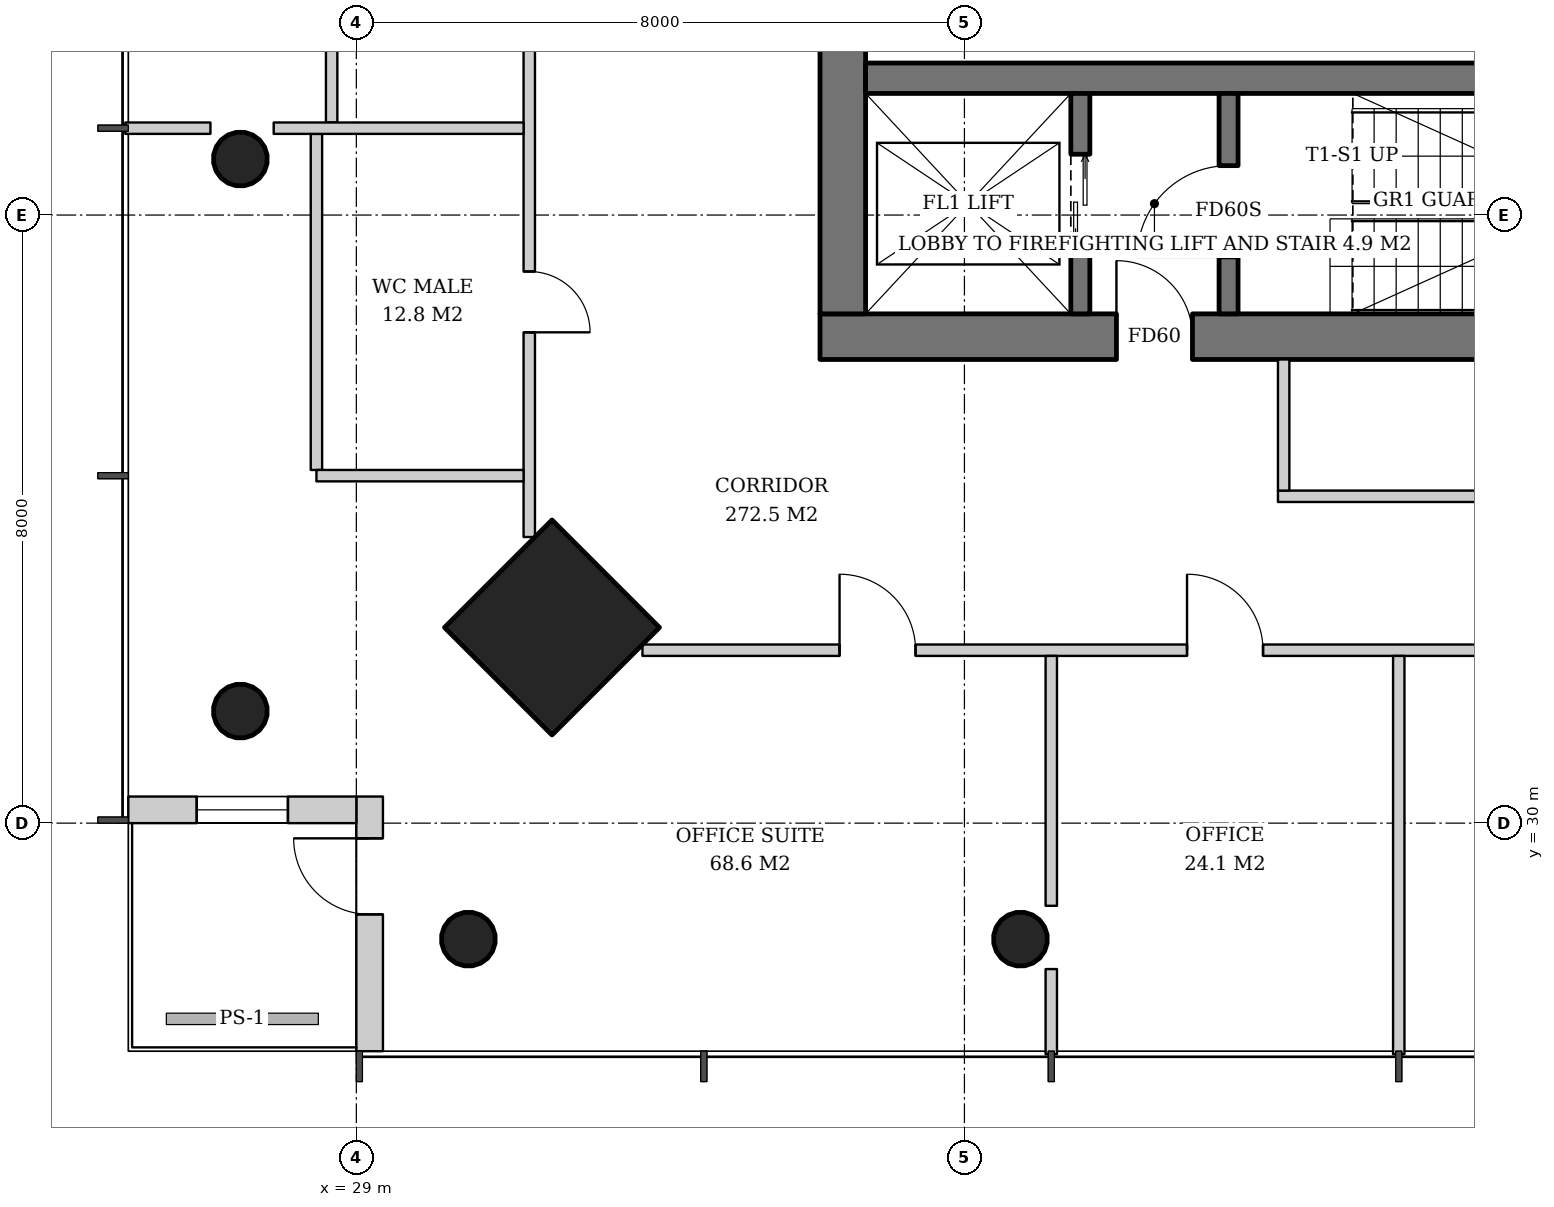
"""IFC4 building model, lengths in metres.
Left out: names, types, materials, properties, quantities, classifications, styles, units other than length and angle.
Written with IfcOpenShell. Run it as: python <this file> out.ifc"""

import sys

from ifc_helpers import new_model, si_unit, direction, frame, frame_2d, origin, origin_2d, place, context, subcontext, project, spatial, rectangle, hollow_circle, extrude, element, fill, save


model = new_model("IFC4")
c1 = context("Model", 3, precision=1e-05, world=origin(), true_north=direction((0.0, 1.0)))
c2 = subcontext(c1, "Body", "Model", "MODEL_VIEW")
j1 = project(units=[si_unit("LENGTHUNIT", "METRE"), si_unit("PLANEANGLEUNIT", "RADIAN")], contexts=[c1])
p1 = place(None, origin())
s1 = spatial("IfcSite", under=j1, at=p1, CompositionType="ELEMENT")
p2 = place(p1, origin())
s2 = spatial("IfcBuilding", under=s1, at=p2, CompositionType="ELEMENT")
p3 = place(p2, frame((0.0, 0.0, 222.4)))
s3 = spatial("IfcBuildingStorey", under=s2, at=p3, CompositionType="ELEMENT", Elevation=222.4)
p4 = place(p3, frame((31.536, 32.536, 0.0), z_axis=(0.031962158256, 0.031962158256, 0.998977898093), x_axis=(-0.707106781187, 0.707106781187, 0.0)))
e1 = element("IfcColumn", 1, at=p4, inside=s3, PredefinedType="COLUMN", context=c2, shape_type="SweptSolid", body=[
    extrude(rectangle(XDim=2.0, YDim=2.0, at=origin_2d()), origin(), (0.0, 0.0, 1.0), 3.804),
])
p5 = place(p3, frame((27.436, 31.436, 0.0), z_axis=(0.031898107953, 0.031898107953, 0.998981992539), x_axis=(-0.707106781187, 0.707106781187, 0.0)))
e2 = element("IfcColumn", 2, at=p5, inside=s3, PredefinedType="COLUMN", context=c2, shape_type="SweptSolid", body=[
    extrude(hollow_circle(Radius=0.355, WallThickness=0.025, at=origin_2d()), origin(), (0.0, 0.0, 1.0), 3.804),
])
p6 = place(p3, frame((27.436, 38.718, 0.0), z_axis=(0.031910269556, 0.015987237665, 0.999362868496), x_axis=(-0.447933021895, 0.894067115991, 0.0)))
e3 = element("IfcColumn", 3, at=p6, inside=s3, PredefinedType="COLUMN", context=c2, shape_type="SweptSolid", body=[
    extrude(hollow_circle(Radius=0.355, WallThickness=0.025, at=origin_2d()), origin(), (0.0, 0.0, 1.0), 3.802),
])
p7 = place(p3, frame((30.436, 28.436, 0.0), z_axis=(0.031898107953, 0.031898107953, 0.998981992539), x_axis=(-0.707106781187, 0.707106781187, 0.0)))
e4 = element("IfcColumn", 4, at=p7, inside=s3, PredefinedType="COLUMN", context=c2, shape_type="SweptSolid", body=[
    extrude(hollow_circle(Radius=0.355, WallThickness=0.025, at=origin_2d()), origin(), (0.0, 0.0, 1.0), 3.804),
])
p8 = place(p3, frame((37.718, 28.436, 0.0), z_axis=(0.015987237665, 0.031910269556, 0.999362868496), x_axis=(-0.894067115991, 0.447933021895, 0.0)))
e5 = element("IfcColumn", 5, at=p8, inside=s3, PredefinedType="COLUMN", context=c2, shape_type="SweptSolid", body=[
    extrude(hollow_circle(Radius=0.355, WallThickness=0.025, at=origin_2d()), origin(), (0.0, 0.0, 1.0), 3.802),
])
p9 = place(p3, frame((35.1, 36.4, 0.0), z_axis=(0.0, 0.0, 1.0), x_axis=(1.0, 0.0, 0.0)))
e6 = element("IfcWall", 6, at=p9, inside=s3, PredefinedType="SHEAR", context=c2, shape_type="SweptSolid", body=[
    extrude(rectangle(XDim=19.8, YDim=0.6, at=frame_2d((9.9, 0.0))), origin(), (0.0, 0.0, 1.0), 3.8),
])
p10 = place(p9, frame((3.9, 0.0, 0.0)))
e7 = element("IfcOpeningElement", 7, at=p10, cuts=e6, PredefinedType="OPENING", context=c2, shape_type="SweptSolid", body=[
    extrude(rectangle(XDim=1.0, YDim=2.1, at=frame_2d((0.5, 1.05))), frame((0.0, 0.31, 0.0), z_axis=(0.0, -1.0, 0.0), x_axis=(1.0, 0.0, 0.0)), (0.0, 0.0, 1.0), 0.62),
])
p11 = place(p9, frame((15.35, 0.0, 0.0)))
e8 = element("IfcOpeningElement", 8, at=p11, cuts=e6, PredefinedType="OPENING", context=c2, shape_type="SweptSolid", body=[
    extrude(rectangle(XDim=1.0, YDim=2.1, at=frame_2d((0.5, 1.05))), frame((0.0, 0.31, 0.0), z_axis=(0.0, -1.0, 0.0), x_axis=(1.0, 0.0, 0.0)), (0.0, 0.0, 1.0), 0.62),
])
p12 = place(p3, frame((35.4, 36.7, 0.0), z_axis=(0.0, 0.0, 1.0), x_axis=(0.0, 1.0, 0.0)))
e9 = element("IfcWall", 9, at=p12, inside=s3, PredefinedType="SHEAR", context=c2, shape_type="SweptSolid", body=[
    extrude(rectangle(XDim=18.6, YDim=0.6, at=frame_2d((9.3, 0.0))), origin(), (0.0, 0.0, 1.0), 3.8),
])
p13 = place(p12, frame((8.4, 0.0, 0.0)))
e10 = element("IfcOpeningElement", 10, at=p13, cuts=e9, PredefinedType="OPENING", context=c2, shape_type="SweptSolid", body=[
    extrude(rectangle(XDim=1.8, YDim=2.4, at=frame_2d((0.9, 1.2))), frame((0.0, 0.31, 0.0), z_axis=(0.0, -1.0, 0.0), x_axis=(1.0, 0.0, 0.0)), (0.0, 0.0, 1.0), 0.62),
])
p14 = place(p3, frame((35.7, 39.8, 0.0), z_axis=(0.0, 0.0, 1.0), x_axis=(1.0, 0.0, 0.0)))
e11 = element("IfcWall", 11, at=p14, inside=s3, PredefinedType="SHEAR", context=c2, shape_type="SweptSolid", body=[
    extrude(rectangle(XDim=18.6, YDim=0.4, at=frame_2d((9.3, 0.0))), origin(), (0.0, 0.0, 1.0), 3.8),
])
p15 = place(p3, frame((29.175, 27.0, 0.0), z_axis=(0.0, 0.0, 1.0), x_axis=(0.0, 1.0, 0.0)))
e12 = element("IfcWall", 12, at=p15, inside=s3, PredefinedType="SOLIDWALL", context=c2, shape_type="SweptSolid", body=[
    extrude(rectangle(XDim=3.35, YDim=0.35, at=frame_2d((1.675, 0.0))), origin(), (0.0, 0.0, 1.0), 3.52),
])
p16 = place(p15, frame((1.8, 0.0, 0.0)))
e13 = element("IfcOpeningElement", 13, at=p16, cuts=e12, PredefinedType="OPENING", context=c2, shape_type="SweptSolid", body=[
    extrude(rectangle(XDim=1.0, YDim=2.4, at=frame_2d((0.5, 1.2))), frame((0.0, 0.185, 0.0), z_axis=(0.0, -1.0, 0.0), x_axis=(1.0, 0.0, 0.0)), (0.0, 0.0, 1.0), 0.37),
])
p17 = place(p3, frame((29.0, 30.175, 0.0), z_axis=(0.0, 0.0, 1.0), x_axis=(-1.0, 0.0, 0.0)))
e14 = element("IfcWall", 14, at=p17, inside=s3, PredefinedType="SOLIDWALL", context=c2, shape_type="SweptSolid", body=[
    extrude(rectangle(XDim=3.0, YDim=0.35, at=frame_2d((1.5, 0.0))), origin(), (0.0, 0.0, 1.0), 3.52),
])
p18 = place(p17, frame((0.9, 0.0, 0.6)))
e15 = element("IfcOpeningElement", 15, at=p18, cuts=e14, PredefinedType="OPENING", context=c2, shape_type="SweptSolid", body=[
    extrude(rectangle(XDim=1.2, YDim=2.55, at=frame_2d((0.6, 1.275))), frame((0.0, 0.185, 0.0), z_axis=(0.0, -1.0, 0.0), x_axis=(1.0, 0.0, 0.0)), (0.0, 0.0, 1.0), 0.37),
])
p19 = place(p3, frame((38.525, 36.7, 0.0), z_axis=(0.0, 0.0, 1.0), x_axis=(0.0, 1.0, 0.0)))
e16 = element("IfcWall", 16, at=p19, inside=s3, PredefinedType="SHEAR", context=c2, shape_type="SweptSolid", body=[
    extrude(rectangle(XDim=2.9, YDim=0.25, at=frame_2d((1.45, 0.0))), origin(), (0.0, 0.0, 1.0), 3.8),
])
p20 = place(p19, frame((0.8, 0.0, 0.0)))
e17 = element("IfcOpeningElement", 17, at=p20, cuts=e16, PredefinedType="OPENING", context=c2, shape_type="SweptSolid", body=[
    extrude(rectangle(XDim=1.3, YDim=2.2, at=frame_2d((0.65, 1.1))), frame((0.0, 0.135, 0.0), z_axis=(0.0, -1.0, 0.0), x_axis=(1.0, 0.0, 0.0)), (0.0, 0.0, 1.0), 0.27),
])
p21 = place(p3, frame((40.475, 36.7, 0.0), z_axis=(0.0, 0.0, 1.0), x_axis=(0.0, 1.0, 0.0)))
e18 = element("IfcWall", 18, at=p21, inside=s3, PredefinedType="SHEAR", context=c2, shape_type="SweptSolid", body=[
    extrude(rectangle(XDim=2.9, YDim=0.25, at=frame_2d((1.45, 0.0))), origin(), (0.0, 0.0, 1.0), 3.8),
])
p22 = place(p21, frame((0.75, 0.0, 0.0)))
e19 = element("IfcOpeningElement", 19, at=p22, cuts=e18, PredefinedType="OPENING", context=c2, shape_type="SweptSolid", body=[
    extrude(rectangle(XDim=1.2, YDim=2.1, at=frame_2d((0.6, 1.05))), frame((0.0, 0.135, 0.0), z_axis=(0.0, -1.0, 0.0), x_axis=(1.0, 0.0, 0.0)), (0.0, 0.0, 1.0), 0.27),
])
p23 = place(p3, frame((41.125, 34.3, 0.0), z_axis=(0.0, 0.0, 1.0), x_axis=(1.0, 0.0, 0.0)))
e20 = element("IfcWall", 20, at=p23, inside=s3, PredefinedType="PARTITIONING", context=c2, shape_type="SweptSolid", body=[
    extrude(rectangle(XDim=8.2, YDim=0.15, at=frame_2d((4.1, 0.0))), origin(), (0.0, 0.0, 1.0), 2.706),
])
p24 = place(p23, frame((3.6, 0.0, 0.0)))
e21 = element("IfcOpeningElement", 21, at=p24, cuts=e20, PredefinedType="OPENING", context=c2, shape_type="SweptSolid", body=[
    extrude(rectangle(XDim=1.0, YDim=2.1, at=frame_2d((0.5, 1.05))), frame((0.0, 0.085, 0.0), z_axis=(0.0, -1.0, 0.0), x_axis=(1.0, 0.0, 0.0)), (0.0, 0.0, 1.0), 0.17),
])
p25 = place(p3, frame((41.2, 36.1, 0.0), z_axis=(0.0, 0.0, 1.0), x_axis=(0.0, -1.0, 0.0)))
e22 = element("IfcWall", 22, at=p25, inside=s3, PredefinedType="PARTITIONING", context=c2, shape_type="SweptSolid", body=[
    extrude(rectangle(XDim=1.725, YDim=0.15, at=frame_2d((0.863, 0.0))), origin(), (0.0, 0.0, 1.0), 3.52),
])
p26 = place(p3, frame((28.675, 43.639, 0.0), z_axis=(0.0, 0.0, 1.0), x_axis=(0.0, -1.0, 0.0)))
e23 = element("IfcWall", 23, at=p26, inside=s3, PredefinedType="PARTITIONING", context=c2, shape_type="SweptSolid", body=[
    extrude(rectangle(XDim=4.422, YDim=0.15, at=frame_2d((2.211, 0.0))), origin(), (0.0, 0.0, 1.0), 2.706),
])
p27 = place(p3, frame((28.475, 39.068, 0.0), z_axis=(0.0, 0.0, 1.0), x_axis=(0.0, -1.0, 0.0)))
e24 = element("IfcWall", 24, at=p27, inside=s3, PredefinedType="PARTITIONING", context=c2, shape_type="SweptSolid", body=[
    extrude(rectangle(XDim=4.421, YDim=0.15, at=frame_2d((2.211, 0.0))), origin(), (0.0, 0.0, 1.0), 2.706),
])
p28 = place(p3, frame((31.275, 58.236, 0.0), z_axis=(0.0, 0.0, 1.0), x_axis=(0.0, -1.0, 0.0)))
e25 = element("IfcWall", 25, at=p28, inside=s3, PredefinedType="PARTITIONING", context=c2, shape_type="SweptSolid", body=[
    extrude(rectangle(XDim=24.472, YDim=0.15, at=frame_2d((12.236, 0.0))), origin(), (0.0, 0.0, 1.0), 2.706),
])
p29 = place(p28, frame((2.593, 0.0, 0.0)))
e26 = element("IfcOpeningElement", 26, at=p29, cuts=e25, PredefinedType="OPENING", context=c2, shape_type="SweptSolid", body=[
    extrude(rectangle(XDim=1.0, YDim=2.1, at=frame_2d((0.5, 1.05))), frame((0.0, 0.085, 0.0), z_axis=(0.0, -1.0, 0.0), x_axis=(1.0, 0.0, 0.0)), (0.0, 0.0, 1.0), 0.17),
])
p30 = place(p28, frame((7.164, 0.0, 0.0)))
e27 = element("IfcOpeningElement", 27, at=p30, cuts=e25, PredefinedType="OPENING", context=c2, shape_type="SweptSolid", body=[
    extrude(rectangle(XDim=1.0, YDim=2.1, at=frame_2d((0.5, 1.05))), frame((0.0, 0.085, 0.0), z_axis=(0.0, -1.0, 0.0), x_axis=(1.0, 0.0, 0.0)), (0.0, 0.0, 1.0), 0.17),
])
p31 = place(p28, frame((11.836, 0.0, 0.0)))
e28 = element("IfcOpeningElement", 28, at=p31, cuts=e25, PredefinedType="OPENING", context=c2, shape_type="SweptSolid", body=[
    extrude(rectangle(XDim=0.8, YDim=2.1, at=frame_2d((0.4, 1.05))), frame((0.0, 0.085, 0.0), z_axis=(0.0, -1.0, 0.0), x_axis=(1.0, 0.0, 0.0)), (0.0, 0.0, 1.0), 0.17),
])
p32 = place(p28, frame((16.307, 0.0, 0.0)))
e29 = element("IfcOpeningElement", 29, at=p32, cuts=e25, PredefinedType="OPENING", context=c2, shape_type="SweptSolid", body=[
    extrude(rectangle(XDim=1.0, YDim=2.1, at=frame_2d((0.5, 1.05))), frame((0.0, 0.085, 0.0), z_axis=(0.0, -1.0, 0.0), x_axis=(1.0, 0.0, 0.0)), (0.0, 0.0, 1.0), 0.17),
])
p33 = place(p28, frame((20.979, 0.0, 0.0)))
e30 = element("IfcOpeningElement", 30, at=p33, cuts=e25, PredefinedType="OPENING", context=c2, shape_type="SweptSolid", body=[
    extrude(rectangle(XDim=0.8, YDim=2.1, at=frame_2d((0.4, 1.05))), frame((0.0, 0.085, 0.0), z_axis=(0.0, -1.0, 0.0), x_axis=(1.0, 0.0, 0.0)), (0.0, 0.0, 1.0), 0.17),
])
p34 = place(p3, frame((31.2, 39.143, 0.0), z_axis=(0.0, 0.0, 1.0), x_axis=(-1.0, 0.0, 0.0)))
e31 = element("IfcWall", 31, at=p34, inside=s3, PredefinedType="PARTITIONING", context=c2, shape_type="SweptSolid", body=[
    extrude(rectangle(XDim=3.287, YDim=0.15, at=frame_2d((1.644, 0.0))), origin(), (0.0, 0.0, 1.0), 3.52),
])
p35 = place(p3, frame((27.08, 39.143, 0.0), z_axis=(0.0, 0.0, 1.0), x_axis=(-1.0, 0.0, 0.0)))
e32 = element("IfcWall", 32, at=p35, inside=s3, PredefinedType="PARTITIONING", context=c2, shape_type="SweptSolid", body=[
    extrude(rectangle(XDim=1.12, YDim=0.15, at=frame_2d((0.56, 0.0))), origin(), (0.0, 0.0, 1.0), 3.52),
])
p36 = place(p3, frame((31.2, 34.572, 0.0), z_axis=(0.0, 0.0, 1.0), x_axis=(-1.0, 0.0, 0.0)))
e33 = element("IfcWall", 33, at=p36, inside=s3, PredefinedType="PARTITIONING", context=c2, shape_type="SweptSolid", body=[
    extrude(rectangle(XDim=2.725, YDim=0.15, at=frame_2d((1.362, 0.0))), origin(), (0.0, 0.0, 1.0), 3.52),
])
p37 = place(p3, frame((32.764, 32.275, 0.0), z_axis=(0.0, 0.0, 1.0), x_axis=(1.0, 0.0, 0.0)))
e34 = element("IfcWall", 34, at=p37, inside=s3, PredefinedType="PARTITIONING", context=c2, shape_type="SweptSolid", body=[
    extrude(rectangle(XDim=24.472, YDim=0.15, at=frame_2d((12.236, 0.0))), origin(), (0.0, 0.0, 1.0), 2.706),
])
p38 = place(p37, frame((2.593, 0.0, 0.0)))
e35 = element("IfcOpeningElement", 35, at=p38, cuts=e34, PredefinedType="OPENING", context=c2, shape_type="SweptSolid", body=[
    extrude(rectangle(XDim=1.0, YDim=2.1, at=frame_2d((0.5, 1.05))), frame((0.0, 0.085, 0.0), z_axis=(0.0, -1.0, 0.0), x_axis=(1.0, 0.0, 0.0)), (0.0, 0.0, 1.0), 0.17),
])
p39 = place(p37, frame((7.164, 0.0, 0.0)))
e36 = element("IfcOpeningElement", 36, at=p39, cuts=e34, PredefinedType="OPENING", context=c2, shape_type="SweptSolid", body=[
    extrude(rectangle(XDim=1.0, YDim=2.1, at=frame_2d((0.5, 1.05))), frame((0.0, 0.085, 0.0), z_axis=(0.0, -1.0, 0.0), x_axis=(1.0, 0.0, 0.0)), (0.0, 0.0, 1.0), 0.17),
])
p40 = place(p37, frame((11.336, 0.0, 0.0)))
e37 = element("IfcOpeningElement", 37, at=p40, cuts=e34, PredefinedType="OPENING", context=c2, shape_type="SweptSolid", body=[
    extrude(rectangle(XDim=1.8, YDim=2.4, at=frame_2d((0.9, 1.2))), frame((0.0, 0.085, 0.0), z_axis=(0.0, -1.0, 0.0), x_axis=(1.0, 0.0, 0.0)), (0.0, 0.0, 1.0), 0.17),
])
p41 = place(p37, frame((20.879, 0.0, 0.0)))
e38 = element("IfcOpeningElement", 38, at=p41, cuts=e34, PredefinedType="OPENING", context=c2, shape_type="SweptSolid", body=[
    extrude(rectangle(XDim=1.0, YDim=2.1, at=frame_2d((0.5, 1.05))), frame((0.0, 0.085, 0.0), z_axis=(0.0, -1.0, 0.0), x_axis=(1.0, 0.0, 0.0)), (0.0, 0.0, 1.0), 0.17),
])
p42 = place(p3, frame((38.143, 32.2, 0.0), z_axis=(0.0, 0.0, 1.0), x_axis=(0.0, -1.0, 0.0)))
e39 = element("IfcWall", 39, at=p42, inside=s3, PredefinedType="PARTITIONING", context=c2, shape_type="SweptSolid", body=[
    extrude(rectangle(XDim=3.287, YDim=0.15, at=frame_2d((1.644, 0.0))), origin(), (0.0, 0.0, 1.0), 3.52),
])
p43 = place(p3, frame((38.143, 28.08, 0.0), z_axis=(0.0, 0.0, 1.0), x_axis=(0.0, -1.0, 0.0)))
e40 = element("IfcWall", 40, at=p43, inside=s3, PredefinedType="PARTITIONING", context=c2, shape_type="SweptSolid", body=[
    extrude(rectangle(XDim=1.12, YDim=0.15, at=frame_2d((0.56, 0.0))), origin(), (0.0, 0.0, 1.0), 3.52),
])
p44 = place(p3, frame((42.714, 32.2, 0.0), z_axis=(0.0, 0.0, 1.0), x_axis=(0.0, -1.0, 0.0)))
e41 = element("IfcWall", 41, at=p44, inside=s3, PredefinedType="PARTITIONING", context=c2, shape_type="SweptSolid", body=[
    extrude(rectangle(XDim=5.24, YDim=0.15, at=frame_2d((2.62, 0.0))), origin(), (0.0, 0.0, 1.0), 3.52),
])
p45 = place(p16, origin())
e42 = element("IfcDoor", 42, at=p45, inside=s3, OperationType="SINGLE_SWING_RIGHT", PredefinedType="DOOR", context=c2, shape_type="SweptSolid", body=[
    extrude(rectangle(XDim=1.0, YDim=2.4, at=frame_2d((0.5, 1.2))), frame((0.0, 0.025, 0.0), z_axis=(0.0, -1.0, 0.0), x_axis=(1.0, 0.0, 0.0)), (0.0, 0.0, 1.0), 0.05),
])
fill(e13, e42)
p46 = place(p18, origin())
e43 = element("IfcWindow", 43, at=p46, inside=s3, PartitioningType="SINGLE_PANEL", PredefinedType="WINDOW", context=c2, shape_type="SweptSolid", body=[
    extrude(rectangle(XDim=1.2, YDim=2.55, at=frame_2d((0.6, 1.275))), frame((0.0, 0.03, 0.0), z_axis=(0.0, -1.0, 0.0), x_axis=(1.0, 0.0, 0.0)), (0.0, 0.0, 1.0), 0.06),
])
fill(e15, e43)
p47 = place(p20, origin())
e44 = element("IfcDoor", 44, at=p47, inside=s3, OperationType="DOUBLE_DOOR_SLIDING", PredefinedType="DOOR", context=c2, shape_type="SweptSolid", body=[
    extrude(rectangle(XDim=1.3, YDim=2.2, at=frame_2d((0.65, 1.1))), frame((0.0, 0.025, 0.0), z_axis=(0.0, -1.0, 0.0), x_axis=(1.0, 0.0, 0.0)), (0.0, 0.0, 1.0), 0.05),
])
fill(e17, e44)
p48 = place(p22, origin())
e45 = element("IfcDoor", 45, at=p48, inside=s3, OperationType="SINGLE_SWING_LEFT", PredefinedType="DOOR", context=c2, shape_type="SweptSolid", body=[
    extrude(rectangle(XDim=1.2, YDim=2.1, at=frame_2d((0.6, 1.05))), frame((0.0, 0.025, 0.0), z_axis=(0.0, -1.0, 0.0), x_axis=(1.0, 0.0, 0.0)), (0.0, 0.0, 1.0), 0.05),
])
fill(e19, e45)
p49 = place(p10, origin())
e46 = element("IfcDoor", 46, at=p49, inside=s3, OperationType="SINGLE_SWING_LEFT", PredefinedType="DOOR", context=c2, shape_type="SweptSolid", body=[
    extrude(rectangle(XDim=1.0, YDim=2.1, at=frame_2d((0.5, 1.05))), frame((0.0, 0.025, 0.0), z_axis=(0.0, -1.0, 0.0), x_axis=(1.0, 0.0, 0.0)), (0.0, 0.0, 1.0), 0.05),
])
fill(e7, e46)
p50 = place(p33, origin())
e47 = element("IfcDoor", 47, at=p50, inside=s3, OperationType="SINGLE_SWING_RIGHT", PredefinedType="DOOR", context=c2, shape_type="SweptSolid", body=[
    extrude(rectangle(XDim=0.8, YDim=2.1, at=frame_2d((0.4, 1.05))), frame((0.0, 0.025, 0.0), z_axis=(0.0, -1.0, 0.0), x_axis=(1.0, 0.0, 0.0)), (0.0, 0.0, 1.0), 0.05),
])
fill(e30, e47)
p51 = place(p38, origin())
e48 = element("IfcDoor", 48, at=p51, inside=s3, OperationType="SINGLE_SWING_LEFT", PredefinedType="DOOR", context=c2, shape_type="SweptSolid", body=[
    extrude(rectangle(XDim=1.0, YDim=2.1, at=frame_2d((0.5, 1.05))), frame((0.0, 0.025, 0.0), z_axis=(0.0, -1.0, 0.0), x_axis=(1.0, 0.0, 0.0)), (0.0, 0.0, 1.0), 0.05),
])
fill(e35, e48)
p52 = place(p39, origin())
e49 = element("IfcDoor", 49, at=p52, inside=s3, OperationType="SINGLE_SWING_LEFT", PredefinedType="DOOR", context=c2, shape_type="SweptSolid", body=[
    extrude(rectangle(XDim=1.0, YDim=2.1, at=frame_2d((0.5, 1.05))), frame((0.0, 0.025, 0.0), z_axis=(0.0, -1.0, 0.0), x_axis=(1.0, 0.0, 0.0)), (0.0, 0.0, 1.0), 0.05),
])
fill(e36, e49)
save(model, sys.argv[1])
